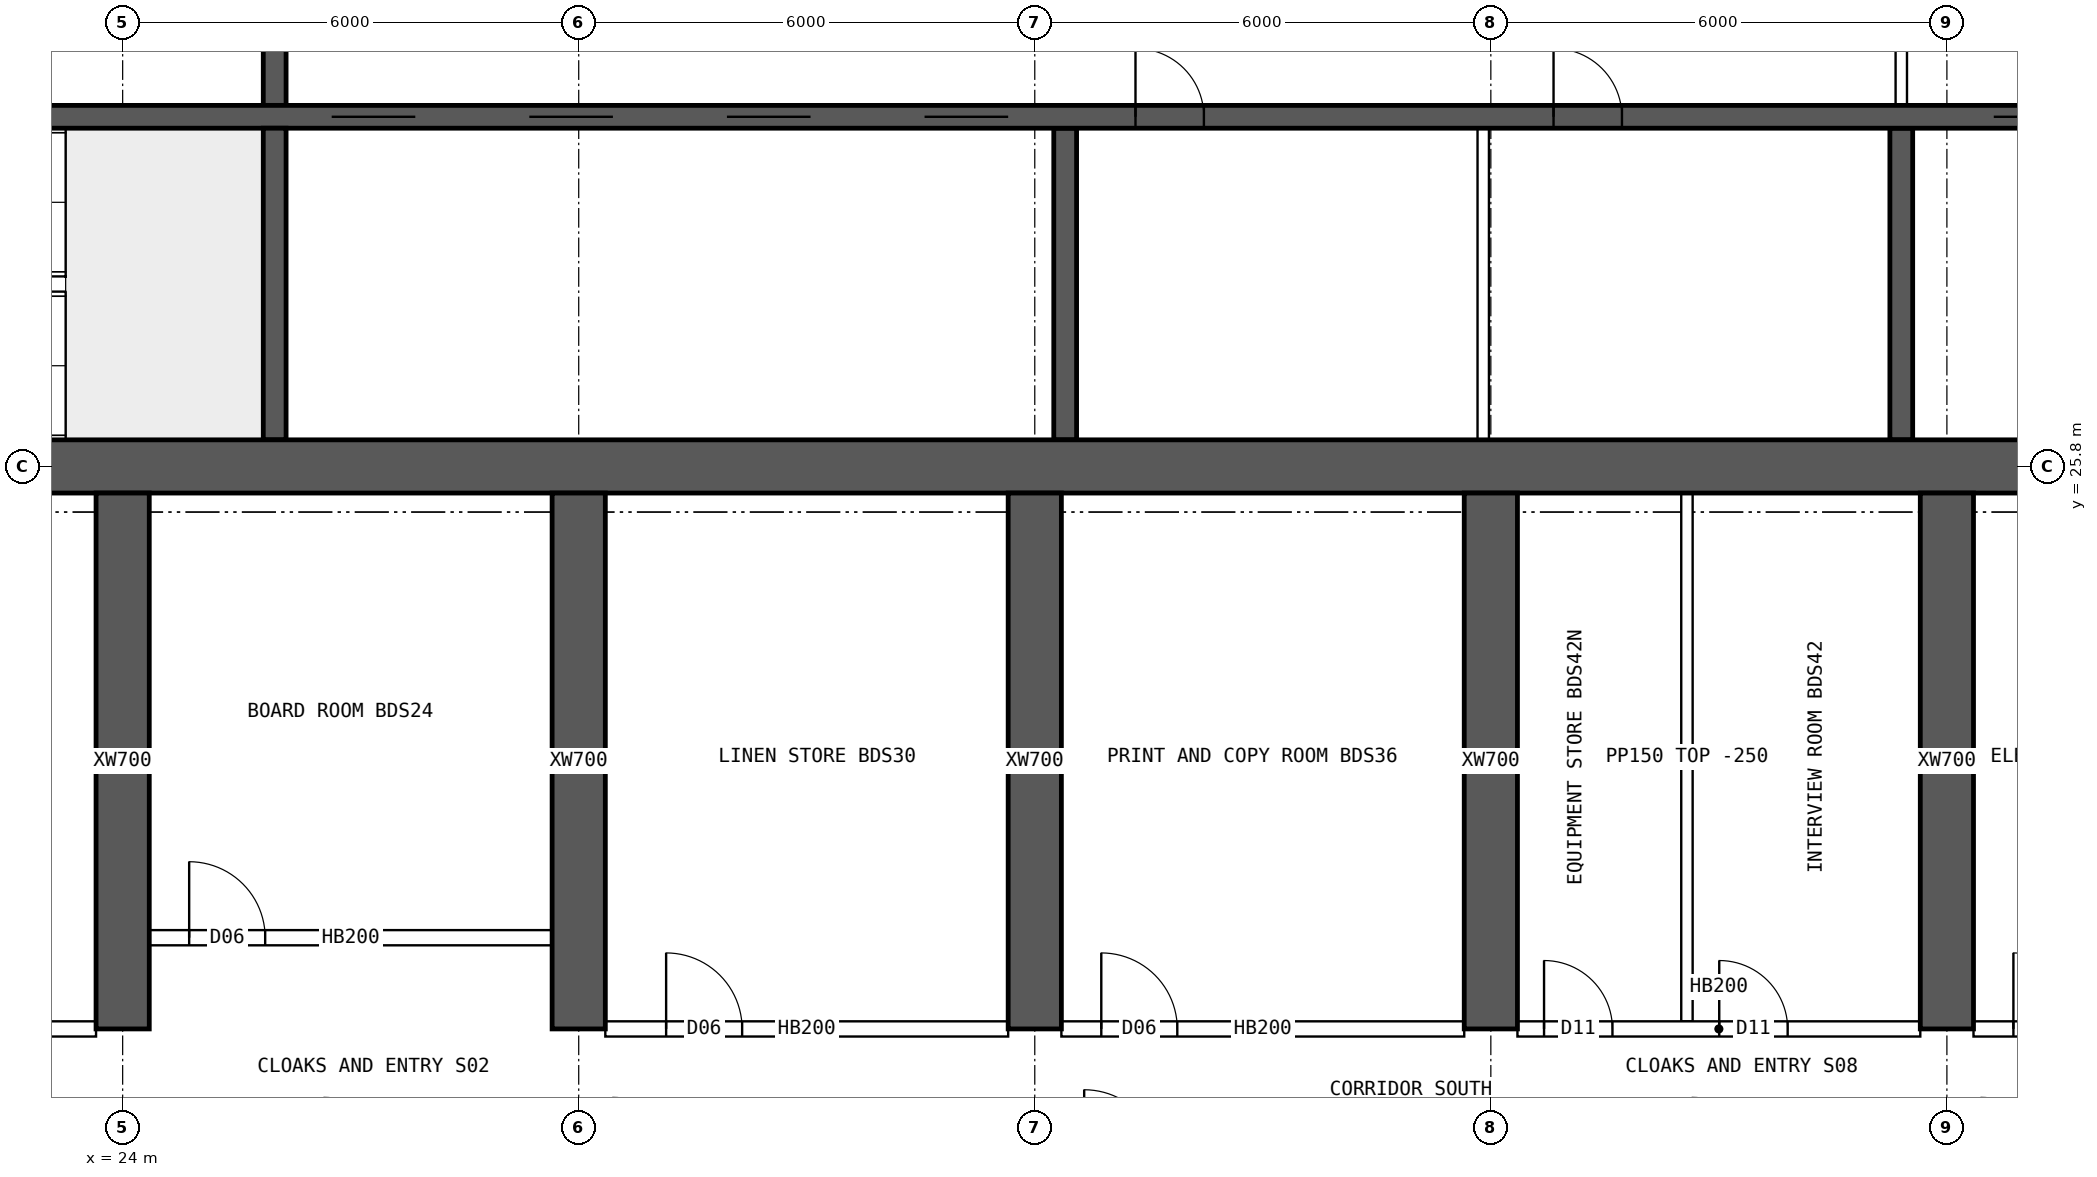
"""IFC4 building model, lengths in metres.
Left out: names, types, materials, properties, quantities, classifications, styles, units other than length and angle.
Written with IfcOpenShell. Run it as: python <this file> out.ifc"""

import sys

from ifc_helpers import new_model, si_unit, direction, frame, frame_2d, origin, place, context, subcontext, project, spatial, rectangle, extrude, element, fill, save


model = new_model("IFC4")
c1 = context("Model", 3, precision=1e-05, world=origin(), true_north=direction((0.0, 1.0)))
c2 = subcontext(c1, "Body", "Model", "MODEL_VIEW")
j1 = project(units=[si_unit("LENGTHUNIT", "METRE"), si_unit("PLANEANGLEUNIT", "RADIAN")], contexts=[c1])
p1 = place(None, origin())
s1 = spatial("IfcSite", under=j1, at=p1, CompositionType="ELEMENT")
p2 = place(p1, origin())
s2 = spatial("IfcBuilding", under=s1, at=p2, CompositionType="ELEMENT")
p3 = place(p2, frame((0.0, 0.0, 220.3)))
s3 = spatial("IfcBuildingStorey", under=s2, at=p3, CompositionType="ELEMENT", Elevation=220.3)
p4 = place(p3, frame((18.0, 25.8, 0.0), z_axis=(0.0, 0.0, 1.0), x_axis=(1.0, 0.0, 0.0)))
e1 = element("IfcWall", 1, at=p4, inside=s3, PredefinedType="SHEAR", context=c2, shape_type="SweptSolid", body=[
    extrude(rectangle(XDim=48.0, YDim=0.7, at=frame_2d((24.0, 0.0))), origin(), (0.0, 0.0, 1.0), 3.75),
])
p5 = place(p3, frame((18.35, 30.4, 0.0), z_axis=(0.0, 0.0, 1.0), x_axis=(1.0, 0.0, 0.0)))
e2 = element("IfcWall", 2, at=p5, inside=s3, PredefinedType="SHEAR", context=c2, shape_type="SweptSolid", body=[
    extrude(rectangle(XDim=47.3, YDim=0.3, at=frame_2d((23.65, 0.0))), origin(), (0.0, 0.0, 1.0), 3.75),
])
p6 = place(p5, frame((0.4, 0.0, 0.0)))
e3 = element("IfcOpeningElement", 3, at=p6, cuts=e2, PredefinedType="OPENING", context=c2, shape_type="SweptSolid", body=[
    extrude(rectangle(XDim=1.0, YDim=2.1, at=frame_2d((0.5, 1.05))), frame((0.0, 0.16, 0.0), z_axis=(0.0, -1.0, 0.0), x_axis=(1.0, 0.0, 0.0)), (0.0, 0.0, 1.0), 0.32),
])
p7 = place(p5, frame((45.9, 0.0, 0.0)))
e4 = element("IfcOpeningElement", 4, at=p7, cuts=e2, PredefinedType="OPENING", context=c2, shape_type="SweptSolid", body=[
    extrude(rectangle(XDim=1.0, YDim=2.1, at=frame_2d((0.5, 1.05))), frame((0.0, 0.16, 0.0), z_axis=(0.0, -1.0, 0.0), x_axis=(1.0, 0.0, 0.0)), (0.0, 0.0, 1.0), 0.32),
])
p8 = place(p5, frame((8.4, 0.0, 0.0)))
e5 = element("IfcOpeningElement", 5, at=p8, cuts=e2, PredefinedType="OPENING", context=c2, shape_type="SweptSolid", body=[
    extrude(rectangle(XDim=1.1, YDim=2.1, at=frame_2d((0.55, 1.05))), frame((0.0, 0.16, 0.0), z_axis=(0.0, -1.0, 0.0), x_axis=(1.0, 0.0, 0.0)), (0.0, 0.0, 1.0), 0.32),
])
p9 = place(p5, frame((11.0, 0.0, 0.0)))
e6 = element("IfcOpeningElement", 6, at=p9, cuts=e2, PredefinedType="OPENING", context=c2, shape_type="SweptSolid", body=[
    extrude(rectangle(XDim=1.1, YDim=2.1, at=frame_2d((0.55, 1.05))), frame((0.0, 0.16, 0.0), z_axis=(0.0, -1.0, 0.0), x_axis=(1.0, 0.0, 0.0)), (0.0, 0.0, 1.0), 0.32),
])
p10 = place(p5, frame((13.6, 0.0, 0.0)))
e7 = element("IfcOpeningElement", 7, at=p10, cuts=e2, PredefinedType="OPENING", context=c2, shape_type="SweptSolid", body=[
    extrude(rectangle(XDim=1.1, YDim=2.1, at=frame_2d((0.55, 1.05))), frame((0.0, 0.16, 0.0), z_axis=(0.0, -1.0, 0.0), x_axis=(1.0, 0.0, 0.0)), (0.0, 0.0, 1.0), 0.32),
])
p11 = place(p5, frame((16.2, 0.0, 0.0)))
e8 = element("IfcOpeningElement", 8, at=p11, cuts=e2, PredefinedType="OPENING", context=c2, shape_type="SweptSolid", body=[
    extrude(rectangle(XDim=1.1, YDim=2.1, at=frame_2d((0.55, 1.05))), frame((0.0, 0.16, 0.0), z_axis=(0.0, -1.0, 0.0), x_axis=(1.0, 0.0, 0.0)), (0.0, 0.0, 1.0), 0.32),
])
p12 = place(p5, frame((18.975, 0.0, 0.0)))
e9 = element("IfcOpeningElement", 9, at=p12, cuts=e2, PredefinedType="OPENING", context=c2, shape_type="SweptSolid", body=[
    extrude(rectangle(XDim=0.9, YDim=2.1, at=frame_2d((0.45, 1.05))), frame((0.0, 0.16, 0.0), z_axis=(0.0, -1.0, 0.0), x_axis=(1.0, 0.0, 0.0)), (0.0, 0.0, 1.0), 0.32),
])
p13 = place(p5, frame((24.475, 0.0, 0.0)))
e10 = element("IfcOpeningElement", 10, at=p13, cuts=e2, PredefinedType="OPENING", context=c2, shape_type="SweptSolid", body=[
    extrude(rectangle(XDim=0.9, YDim=2.1, at=frame_2d((0.45, 1.05))), frame((0.0, 0.16, 0.0), z_axis=(0.0, -1.0, 0.0), x_axis=(1.0, 0.0, 0.0)), (0.0, 0.0, 1.0), 0.32),
])
p14 = place(p5, frame((30.267, 0.0, 0.0)))
e11 = element("IfcOpeningElement", 11, at=p14, cuts=e2, PredefinedType="OPENING", context=c2, shape_type="SweptSolid", body=[
    extrude(rectangle(XDim=1.1, YDim=2.1, at=frame_2d((0.55, 1.05))), frame((0.0, 0.16, 0.0), z_axis=(0.0, -1.0, 0.0), x_axis=(1.0, 0.0, 0.0)), (0.0, 0.0, 1.0), 0.32),
])
p15 = place(p5, frame((33.8, 0.0, 0.0)))
e12 = element("IfcOpeningElement", 12, at=p15, cuts=e2, PredefinedType="OPENING", context=c2, shape_type="SweptSolid", body=[
    extrude(rectangle(XDim=1.1, YDim=2.1, at=frame_2d((0.55, 1.05))), frame((0.0, 0.16, 0.0), z_axis=(0.0, -1.0, 0.0), x_axis=(1.0, 0.0, 0.0)), (0.0, 0.0, 1.0), 0.32),
])
p16 = place(p5, frame((37.333, 0.0, 0.0)))
e13 = element("IfcOpeningElement", 13, at=p16, cuts=e2, PredefinedType="OPENING", context=c2, shape_type="SweptSolid", body=[
    extrude(rectangle(XDim=1.1, YDim=2.1, at=frame_2d((0.55, 1.05))), frame((0.0, 0.16, 0.0), z_axis=(0.0, -1.0, 0.0), x_axis=(1.0, 0.0, 0.0)), (0.0, 0.0, 1.0), 0.32),
])
p17 = place(p3, frame((26.0, 26.15, 0.0), z_axis=(0.0, 0.0, 1.0), x_axis=(0.0, 1.0, 0.0)))
e14 = element("IfcWall", 14, at=p17, inside=s3, PredefinedType="SHEAR", context=c2, shape_type="SweptSolid", body=[
    extrude(rectangle(XDim=4.1, YDim=0.3, at=frame_2d((2.05, 0.0))), origin(), (0.0, 0.0, 1.0), 3.75),
])
p18 = place(p3, frame((26.0, 30.55, 0.0), z_axis=(0.0, 0.0, 1.0), x_axis=(0.0, 1.0, 0.0)))
e15 = element("IfcWall", 15, at=p18, inside=s3, PredefinedType="SHEAR", context=c2, shape_type="SweptSolid", body=[
    extrude(rectangle(XDim=3.9, YDim=0.3, at=frame_2d((1.95, 0.0))), origin(), (0.0, 0.0, 1.0), 3.75),
])
p19 = place(p18, frame((1.4, 0.0, 0.0)))
e16 = element("IfcOpeningElement", 16, at=p19, cuts=e15, PredefinedType="OPENING", context=c2, shape_type="SweptSolid", body=[
    extrude(rectangle(XDim=1.2, YDim=2.1, at=frame_2d((0.6, 1.05))), frame((0.0, 0.16, 0.0), z_axis=(0.0, -1.0, 0.0), x_axis=(1.0, 0.0, 0.0)), (0.0, 0.0, 1.0), 0.32),
])
for number, where, z_axis, x_axis in (
    (17, (36.4, 26.15, 0.0), (0.0, 0.0, 1.0), (0.0, 1.0, 0.0)),
    (18, (47.4, 26.15, 0.0), (0.0, 0.0, 1.0), (0.0, 1.0, 0.0)),
):
    element("IfcWall", number, at=place(p3, frame(where, z_axis=z_axis, x_axis=x_axis)), inside=s3, PredefinedType="SHEAR", context=c2, shape_type="SweptSolid", body=[
        extrude(rectangle(XDim=4.1, YDim=0.3, at=frame_2d((2.05, 0.0))), origin(), (0.0, 0.0, 1.0), 3.75),
    ])
for number, where, z_axis, x_axis in (
    (19, (24.0, 18.4, 0.0), (0.0, 0.0, 1.0), (0.0, 1.0, 0.0)),
    (20, (30.0, 18.4, 0.0), (0.0, 0.0, 1.0), (0.0, 1.0, 0.0)),
    (21, (36.0, 18.4, 0.0), (0.0, 0.0, 1.0), (0.0, 1.0, 0.0)),
    (22, (42.0, 18.4, 0.0), (0.0, 0.0, 1.0), (0.0, 1.0, 0.0)),
    (23, (48.0, 18.4, 0.0), (0.0, 0.0, 1.0), (0.0, 1.0, 0.0)),
):
    element("IfcWall", number, at=place(p3, frame(where, z_axis=z_axis, x_axis=x_axis)), inside=s3, PredefinedType="SHEAR", context=c2, shape_type="SweptSolid", body=[
        extrude(rectangle(XDim=7.05, YDim=0.7, at=frame_2d((3.525, 0.0))), origin(), (0.0, 0.0, 1.0), 3.75),
    ])
p20 = place(p3, frame((47.4, 30.55, 0.0), z_axis=(0.0, 0.0, 1.0), x_axis=(0.0, 1.0, 0.0)))
e24 = element("IfcWall", 24, at=p20, inside=s3, PredefinedType="SOLIDWALL", context=c2, shape_type="SweptSolid", body=[
    extrude(rectangle(XDim=3.9, YDim=0.15, at=frame_2d((1.95, 0.0))), origin(), (0.0, 0.0, 1.0), 3.5),
])
p21 = place(p20, frame((1.15, 0.0, 0.0)))
e25 = element("IfcOpeningElement", 25, at=p21, cuts=e24, PredefinedType="OPENING", context=c2, shape_type="SweptSolid", body=[
    extrude(rectangle(XDim=1.6, YDim=2.1, at=frame_2d((0.8, 1.05))), frame((0.0, 0.085, 0.0), z_axis=(0.0, -1.0, 0.0), x_axis=(1.0, 0.0, 0.0)), (0.0, 0.0, 1.0), 0.17),
])
p22 = place(p3, frame((41.9, 26.15, 0.0), z_axis=(0.0, 0.0, 1.0), x_axis=(0.0, 1.0, 0.0)))
e26 = element("IfcWall", 26, at=p22, inside=s3, PredefinedType="SOLIDWALL", context=c2, shape_type="SweptSolid", body=[
    extrude(rectangle(XDim=4.1, YDim=0.15, at=frame_2d((2.05, 0.0))), origin(), (0.0, 0.0, 1.0), 3.5),
])
p23 = place(p3, frame((18.35, 18.4, 0.0), z_axis=(0.0, 0.0, 1.0), x_axis=(1.0, 0.0, 0.0)))
e27 = element("IfcWall", 27, at=p23, inside=s3, PredefinedType="SOLIDWALL", context=c2, shape_type="SweptSolid", body=[
    extrude(rectangle(XDim=5.3, YDim=0.2, at=frame_2d((2.65, 0.0))), origin(), (0.0, 0.0, 1.0), 3.5),
])
p24 = place(p23, frame((0.35, 0.0, 0.0)))
e28 = element("IfcOpeningElement", 28, at=p24, cuts=e27, PredefinedType="OPENING", context=c2, shape_type="SweptSolid", body=[
    extrude(rectangle(XDim=0.9, YDim=2.1, at=frame_2d((0.45, 1.05))), frame((0.0, 0.11, 0.0), z_axis=(0.0, -1.0, 0.0), x_axis=(1.0, 0.0, 0.0)), (0.0, 0.0, 1.0), 0.22),
])
p25 = place(p23, frame((3.165, 0.0, 0.0)))
e29 = element("IfcOpeningElement", 29, at=p25, cuts=e27, PredefinedType="OPENING", context=c2, shape_type="SweptSolid", body=[
    extrude(rectangle(XDim=0.9, YDim=2.1, at=frame_2d((0.45, 1.05))), frame((0.0, 0.11, 0.0), z_axis=(0.0, -1.0, 0.0), x_axis=(1.0, 0.0, 0.0)), (0.0, 0.0, 1.0), 0.22),
])
p26 = place(p3, frame((30.35, 18.4, 0.0), z_axis=(0.0, 0.0, 1.0), x_axis=(1.0, 0.0, 0.0)))
e30 = element("IfcWall", 30, at=p26, inside=s3, PredefinedType="SOLIDWALL", context=c2, shape_type="SweptSolid", body=[
    extrude(rectangle(XDim=5.3, YDim=0.2, at=frame_2d((2.65, 0.0))), origin(), (0.0, 0.0, 1.0), 3.5),
])
p27 = place(p26, frame((0.8, 0.0, 0.0)))
e31 = element("IfcOpeningElement", 31, at=p27, cuts=e30, PredefinedType="OPENING", context=c2, shape_type="SweptSolid", body=[
    extrude(rectangle(XDim=1.0, YDim=2.1, at=frame_2d((0.5, 1.05))), frame((0.0, 0.11, 0.0), z_axis=(0.0, -1.0, 0.0), x_axis=(1.0, 0.0, 0.0)), (0.0, 0.0, 1.0), 0.22),
])
p28 = place(p3, frame((36.35, 18.4, 0.0), z_axis=(0.0, 0.0, 1.0), x_axis=(1.0, 0.0, 0.0)))
e32 = element("IfcWall", 32, at=p28, inside=s3, PredefinedType="SOLIDWALL", context=c2, shape_type="SweptSolid", body=[
    extrude(rectangle(XDim=5.3, YDim=0.2, at=frame_2d((2.65, 0.0))), origin(), (0.0, 0.0, 1.0), 3.5),
])
p29 = place(p28, frame((0.525, 0.0, 0.0)))
e33 = element("IfcOpeningElement", 33, at=p29, cuts=e32, PredefinedType="OPENING", context=c2, shape_type="SweptSolid", body=[
    extrude(rectangle(XDim=1.0, YDim=2.1, at=frame_2d((0.5, 1.05))), frame((0.0, 0.11, 0.0), z_axis=(0.0, -1.0, 0.0), x_axis=(1.0, 0.0, 0.0)), (0.0, 0.0, 1.0), 0.22),
])
p30 = place(p3, frame((42.35, 18.4, 0.0), z_axis=(0.0, 0.0, 1.0), x_axis=(1.0, 0.0, 0.0)))
e34 = element("IfcWall", 34, at=p30, inside=s3, PredefinedType="SOLIDWALL", context=c2, shape_type="SweptSolid", body=[
    extrude(rectangle(XDim=5.3, YDim=0.2, at=frame_2d((2.65, 0.0))), origin(), (0.0, 0.0, 1.0), 3.5),
])
p31 = place(p30, frame((0.35, 0.0, 0.0)))
e35 = element("IfcOpeningElement", 35, at=p31, cuts=e34, PredefinedType="OPENING", context=c2, shape_type="SweptSolid", body=[
    extrude(rectangle(XDim=0.9, YDim=2.1, at=frame_2d((0.45, 1.05))), frame((0.0, 0.11, 0.0), z_axis=(0.0, -1.0, 0.0), x_axis=(1.0, 0.0, 0.0)), (0.0, 0.0, 1.0), 0.22),
])
p32 = place(p30, frame((2.655, 0.0, 0.0)))
e36 = element("IfcOpeningElement", 36, at=p32, cuts=e34, PredefinedType="OPENING", context=c2, shape_type="SweptSolid", body=[
    extrude(rectangle(XDim=0.9, YDim=2.1, at=frame_2d((0.45, 1.05))), frame((0.0, 0.11, 0.0), z_axis=(0.0, -1.0, 0.0), x_axis=(1.0, 0.0, 0.0)), (0.0, 0.0, 1.0), 0.22),
])
p33 = place(p3, frame((48.35, 18.4, 0.0), z_axis=(0.0, 0.0, 1.0), x_axis=(1.0, 0.0, 0.0)))
e37 = element("IfcWall", 37, at=p33, inside=s3, PredefinedType="SOLIDWALL", context=c2, shape_type="SweptSolid", body=[
    extrude(rectangle(XDim=5.3, YDim=0.2, at=frame_2d((2.65, 0.0))), origin(), (0.0, 0.0, 1.0), 3.5),
])
p34 = place(p33, frame((0.525, 0.0, 0.0)))
e38 = element("IfcOpeningElement", 38, at=p34, cuts=e37, PredefinedType="OPENING", context=c2, shape_type="SweptSolid", body=[
    extrude(rectangle(XDim=1.0, YDim=2.1, at=frame_2d((0.5, 1.05))), frame((0.0, 0.11, 0.0), z_axis=(0.0, -1.0, 0.0), x_axis=(1.0, 0.0, 0.0)), (0.0, 0.0, 1.0), 0.22),
])
p35 = place(p3, frame((24.35, 19.6, 0.0), z_axis=(0.0, 0.0, 1.0), x_axis=(1.0, 0.0, 0.0)))
e39 = element("IfcWall", 39, at=p35, inside=s3, PredefinedType="SOLIDWALL", context=c2, shape_type="SweptSolid", body=[
    extrude(rectangle(XDim=5.3, YDim=0.2, at=frame_2d((2.65, 0.0))), origin(), (0.0, 0.0, 1.0), 3.5),
])
p36 = place(p35, frame((0.525, 0.0, 0.0)))
e40 = element("IfcOpeningElement", 40, at=p36, cuts=e39, PredefinedType="OPENING", context=c2, shape_type="SweptSolid", body=[
    extrude(rectangle(XDim=1.0, YDim=2.1, at=frame_2d((0.5, 1.05))), frame((0.0, 0.11, 0.0), z_axis=(0.0, -1.0, 0.0), x_axis=(1.0, 0.0, 0.0)), (0.0, 0.0, 1.0), 0.22),
])
p37 = place(p3, frame((44.58, 18.5, 0.0), z_axis=(0.0, 0.0, 1.0), x_axis=(0.0, 1.0, 0.0)))
e41 = element("IfcWall", 41, at=p37, inside=s3, PredefinedType="PARTITIONING", context=c2, shape_type="SweptSolid", body=[
    extrude(rectangle(XDim=6.95, YDim=0.15, at=frame_2d((3.475, 0.0))), origin(), (0.0, 0.0, 1.0), 3.5),
])
p38 = place(p8, origin())
e42 = element("IfcDoor", 42, at=p38, inside=s3, OperationType="DOUBLE_DOOR_SLIDING", PredefinedType="DOOR", context=c2, shape_type="SweptSolid", body=[
    extrude(rectangle(XDim=1.1, YDim=2.1, at=frame_2d((0.55, 1.05))), frame((0.0, 0.025, 0.0), z_axis=(0.0, -1.0, 0.0), x_axis=(1.0, 0.0, 0.0)), (0.0, 0.0, 1.0), 0.05),
])
fill(e5, e42)
p39 = place(p9, origin())
e43 = element("IfcDoor", 43, at=p39, inside=s3, OperationType="DOUBLE_DOOR_SLIDING", PredefinedType="DOOR", context=c2, shape_type="SweptSolid", body=[
    extrude(rectangle(XDim=1.1, YDim=2.1, at=frame_2d((0.55, 1.05))), frame((0.0, 0.025, 0.0), z_axis=(0.0, -1.0, 0.0), x_axis=(1.0, 0.0, 0.0)), (0.0, 0.0, 1.0), 0.05),
])
fill(e6, e43)
p40 = place(p10, origin())
e44 = element("IfcDoor", 44, at=p40, inside=s3, OperationType="DOUBLE_DOOR_SLIDING", PredefinedType="DOOR", context=c2, shape_type="SweptSolid", body=[
    extrude(rectangle(XDim=1.1, YDim=2.1, at=frame_2d((0.55, 1.05))), frame((0.0, 0.025, 0.0), z_axis=(0.0, -1.0, 0.0), x_axis=(1.0, 0.0, 0.0)), (0.0, 0.0, 1.0), 0.05),
])
fill(e7, e44)
p41 = place(p11, origin())
e45 = element("IfcDoor", 45, at=p41, inside=s3, OperationType="DOUBLE_DOOR_SLIDING", PredefinedType="DOOR", context=c2, shape_type="SweptSolid", body=[
    extrude(rectangle(XDim=1.1, YDim=2.1, at=frame_2d((0.55, 1.05))), frame((0.0, 0.025, 0.0), z_axis=(0.0, -1.0, 0.0), x_axis=(1.0, 0.0, 0.0)), (0.0, 0.0, 1.0), 0.05),
])
fill(e8, e45)
p42 = place(p12, origin())
e46 = element("IfcDoor", 46, at=p42, inside=s3, OperationType="SINGLE_SWING_LEFT", PredefinedType="DOOR", context=c2, shape_type="SweptSolid", body=[
    extrude(rectangle(XDim=0.9, YDim=2.1, at=frame_2d((0.45, 1.05))), frame((0.0, 0.025, 0.0), z_axis=(0.0, -1.0, 0.0), x_axis=(1.0, 0.0, 0.0)), (0.0, 0.0, 1.0), 0.05),
])
fill(e9, e46)
p43 = place(p13, origin())
e47 = element("IfcDoor", 47, at=p43, inside=s3, OperationType="SINGLE_SWING_LEFT", PredefinedType="DOOR", context=c2, shape_type="SweptSolid", body=[
    extrude(rectangle(XDim=0.9, YDim=2.1, at=frame_2d((0.45, 1.05))), frame((0.0, 0.025, 0.0), z_axis=(0.0, -1.0, 0.0), x_axis=(1.0, 0.0, 0.0)), (0.0, 0.0, 1.0), 0.05),
])
fill(e10, e47)
p44 = place(p14, origin())
e48 = element("IfcDoor", 48, at=p44, inside=s3, OperationType="DOUBLE_DOOR_SLIDING", PredefinedType="DOOR", context=c2, shape_type="SweptSolid", body=[
    extrude(rectangle(XDim=1.1, YDim=2.1, at=frame_2d((0.55, 1.05))), frame((0.0, 0.025, 0.0), z_axis=(0.0, -1.0, 0.0), x_axis=(1.0, 0.0, 0.0)), (0.0, 0.0, 1.0), 0.05),
])
fill(e11, e48)
p45 = place(p36, origin())
e49 = element("IfcDoor", 49, at=p45, inside=s3, OperationType="SINGLE_SWING_LEFT", PredefinedType="DOOR", context=c2, shape_type="SweptSolid", body=[
    extrude(rectangle(XDim=1.0, YDim=2.1, at=frame_2d((0.5, 1.05))), frame((0.0, 0.025, 0.0), z_axis=(0.0, -1.0, 0.0), x_axis=(1.0, 0.0, 0.0)), (0.0, 0.0, 1.0), 0.05),
])
fill(e40, e49)
p46 = place(p27, origin())
e50 = element("IfcDoor", 50, at=p46, inside=s3, OperationType="SINGLE_SWING_LEFT", PredefinedType="DOOR", context=c2, shape_type="SweptSolid", body=[
    extrude(rectangle(XDim=1.0, YDim=2.1, at=frame_2d((0.5, 1.05))), frame((0.0, 0.025, 0.0), z_axis=(0.0, -1.0, 0.0), x_axis=(1.0, 0.0, 0.0)), (0.0, 0.0, 1.0), 0.05),
])
fill(e31, e50)
p47 = place(p29, origin())
e51 = element("IfcDoor", 51, at=p47, inside=s3, OperationType="SINGLE_SWING_LEFT", PredefinedType="DOOR", context=c2, shape_type="SweptSolid", body=[
    extrude(rectangle(XDim=1.0, YDim=2.1, at=frame_2d((0.5, 1.05))), frame((0.0, 0.025, 0.0), z_axis=(0.0, -1.0, 0.0), x_axis=(1.0, 0.0, 0.0)), (0.0, 0.0, 1.0), 0.05),
])
fill(e33, e51)
p48 = place(p31, origin())
e52 = element("IfcDoor", 52, at=p48, inside=s3, OperationType="SINGLE_SWING_LEFT", PredefinedType="DOOR", context=c2, shape_type="SweptSolid", body=[
    extrude(rectangle(XDim=0.9, YDim=2.1, at=frame_2d((0.45, 1.05))), frame((0.0, 0.025, 0.0), z_axis=(0.0, -1.0, 0.0), x_axis=(1.0, 0.0, 0.0)), (0.0, 0.0, 1.0), 0.05),
])
fill(e35, e52)
p49 = place(p32, origin())
e53 = element("IfcDoor", 53, at=p49, inside=s3, OperationType="SINGLE_SWING_LEFT", PredefinedType="DOOR", context=c2, shape_type="SweptSolid", body=[
    extrude(rectangle(XDim=0.9, YDim=2.1, at=frame_2d((0.45, 1.05))), frame((0.0, 0.025, 0.0), z_axis=(0.0, -1.0, 0.0), x_axis=(1.0, 0.0, 0.0)), (0.0, 0.0, 1.0), 0.05),
])
fill(e36, e53)
p50 = place(p34, origin())
e54 = element("IfcDoor", 54, at=p50, inside=s3, OperationType="SINGLE_SWING_LEFT", PredefinedType="DOOR", context=c2, shape_type="SweptSolid", body=[
    extrude(rectangle(XDim=1.0, YDim=2.1, at=frame_2d((0.5, 1.05))), frame((0.0, 0.025, 0.0), z_axis=(0.0, -1.0, 0.0), x_axis=(1.0, 0.0, 0.0)), (0.0, 0.0, 1.0), 0.05),
])
fill(e38, e54)
save(model, sys.argv[1])
